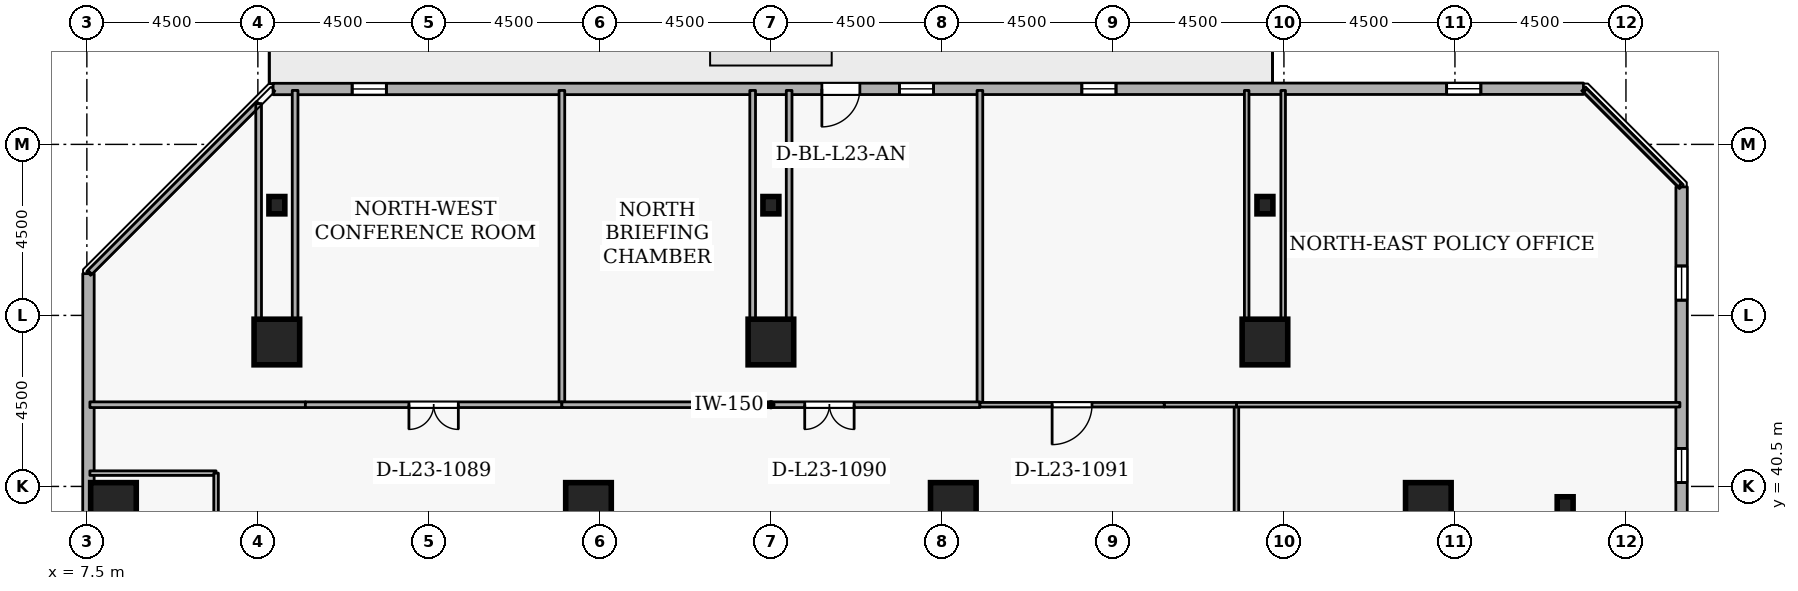
"""IFC4 building model, lengths in metres.
Left out: names, types, materials, properties, quantities, classifications, styles, units other than length and angle.
Written with IfcOpenShell. Run it as: python <this file> out.ifc"""

import sys

from ifc_helpers import new_model, si_unit, direction, frame, frame_2d, origin, origin_2d, place, context, subcontext, project, spatial, rectangle, i_section, extrude, element, fill, save


model = new_model("IFC4")
c1 = context("Model", 3, precision=1e-05, world=origin(), true_north=direction((0.0, 1.0)))
c2 = subcontext(c1, "Body", "Model", "MODEL_VIEW")
j1 = project(units=[si_unit("LENGTHUNIT", "METRE"), si_unit("PLANEANGLEUNIT", "RADIAN")], contexts=[c1])
p1 = place(None, origin())
s1 = spatial("IfcSite", under=j1, at=p1, CompositionType="ELEMENT")
p2 = place(p1, origin())
s2 = spatial("IfcBuilding", under=s1, at=p2, CompositionType="ELEMENT")
p3 = place(p2, frame((0.0, 0.0, 90.9)))
s3 = spatial("IfcBuildingStorey", under=s2, at=p3, CompositionType="ELEMENT", Elevation=90.9)
for number, where, z_axis, x_axis in (
    (1, (42.8, 40.0, 0.0), (0.0, 0.0, 1.0), (1.0, 0.0, 0.0)),
    (2, (12.5, 44.3, 0.0), (0.0, 0.0, 1.0), (1.0, 0.0, 0.0)),
    (3, (25.5, 44.3, 0.0), (0.0, 0.0, 1.0), (1.0, 0.0, 0.0)),
    (4, (38.5, 44.3, 0.0), (0.0, 0.0, 1.0), (1.0, 0.0, 0.0)),
    (5, (8.2, 40.0, 0.0), (0.0, 0.0, 1.0), (1.0, 0.0, 0.0)),
    (6, (20.7, 40.0, 0.0), (0.0, 0.0, 1.0), (1.0, 0.0, 0.0)),
    (7, (30.3, 40.0, 0.0), (0.0, 0.0, 1.0), (1.0, 0.0, 0.0)),
):
    element("IfcColumn", number, at=place(p3, frame(where, z_axis=z_axis, x_axis=x_axis)), inside=s3, PredefinedType="COLUMN", context=c2, shape_type="SweptSolid", body=[
        extrude(rectangle(XDim=1.2, YDim=1.2, at=origin_2d()), origin(), (0.0, 0.0, 1.0), 3.6),
    ])
for number, where, z_axis, x_axis in (
    (8, (46.4, 40.0, 0.0), (0.0, 0.0, 1.0), (1.0, 0.0, 0.0)),
    (9, (12.5, 47.9, 0.0), (0.0, 0.0, 1.0), (1.0, 0.0, 0.0)),
    (10, (25.5, 47.9, 0.0), (0.0, 0.0, 1.0), (1.0, 0.0, 0.0)),
    (11, (38.5, 47.9, 0.0), (0.0, 0.0, 1.0), (1.0, 0.0, 0.0)),
):
    element("IfcColumn", number, at=place(p3, frame(where, z_axis=z_axis, x_axis=x_axis)), inside=s3, PredefinedType="COLUMN", context=c2, shape_type="SweptSolid", body=[
        extrude(i_section(OverallWidth=0.418, OverallDepth=0.456, WebThickness=0.042, FlangeThickness=0.067, FilletRadius=0.015, at=origin_2d()), origin(), (0.0, 0.0, 1.0), 3.6),
    ])
p4 = place(p3, frame((49.457, 13.901, 0.0), z_axis=(0.0, 0.0, 1.0), x_axis=(0.000212414941, 0.99999997744, 0.0)))
e12 = element("IfcWall", 12, at=p4, inside=s3, PredefinedType="STANDARD", context=c2, shape_type="SweptSolid", body=[
    extrude(rectangle(XDim=34.481, YDim=0.3, at=frame_2d((17.24, 0.0))), origin(), (0.0, 0.0, 1.0), 2.7),
])
p5 = place(p4, frame((2.7, 0.0, 0.72)))
e13 = element("IfcOpeningElement", 13, at=p5, cuts=e12, PredefinedType="OPENING", context=c2, shape_type="SweptSolid", body=[
    extrude(rectangle(XDim=0.9, YDim=1.75, at=frame_2d((0.45, 0.875))), frame((0.0, 0.16, 0.0), z_axis=(0.0, -1.0, 0.0), x_axis=(1.0, 0.0, 0.0)), (0.0, 0.0, 1.0), 0.32),
])
p6 = place(p4, frame((7.5, 0.0, 0.72)))
e14 = element("IfcOpeningElement", 14, at=p6, cuts=e12, PredefinedType="OPENING", context=c2, shape_type="SweptSolid", body=[
    extrude(rectangle(XDim=0.9, YDim=1.75, at=frame_2d((0.45, 0.875))), frame((0.0, 0.16, 0.0), z_axis=(0.0, -1.0, 0.0), x_axis=(1.0, 0.0, 0.0)), (0.0, 0.0, 1.0), 0.32),
])
p7 = place(p4, frame((17.1, 0.0, 0.72)))
e15 = element("IfcOpeningElement", 15, at=p7, cuts=e12, PredefinedType="OPENING", context=c2, shape_type="SweptSolid", body=[
    extrude(rectangle(XDim=0.9, YDim=1.75, at=frame_2d((0.45, 0.875))), frame((0.0, 0.16, 0.0), z_axis=(0.0, -1.0, 0.0), x_axis=(1.0, 0.0, 0.0)), (0.0, 0.0, 1.0), 0.32),
])
p8 = place(p4, frame((21.9, 0.0, 0.72)))
e16 = element("IfcOpeningElement", 16, at=p8, cuts=e12, PredefinedType="OPENING", context=c2, shape_type="SweptSolid", body=[
    extrude(rectangle(XDim=0.9, YDim=1.75, at=frame_2d((0.45, 0.875))), frame((0.0, 0.16, 0.0), z_axis=(0.0, -1.0, 0.0), x_axis=(1.0, 0.0, 0.0)), (0.0, 0.0, 1.0), 0.32),
])
p9 = place(p4, frame((26.7, 0.0, 0.72)))
e17 = element("IfcOpeningElement", 17, at=p9, cuts=e12, PredefinedType="OPENING", context=c2, shape_type="SweptSolid", body=[
    extrude(rectangle(XDim=0.9, YDim=1.75, at=frame_2d((0.45, 0.875))), frame((0.0, 0.16, 0.0), z_axis=(0.0, -1.0, 0.0), x_axis=(1.0, 0.0, 0.0)), (0.0, 0.0, 1.0), 0.32),
])
p10 = place(p4, frame((31.5, 0.0, 0.72)))
e18 = element("IfcOpeningElement", 18, at=p10, cuts=e12, PredefinedType="OPENING", context=c2, shape_type="SweptSolid", body=[
    extrude(rectangle(XDim=0.9, YDim=1.75, at=frame_2d((0.45, 0.875))), frame((0.0, 0.16, 0.0), z_axis=(0.0, -1.0, 0.0), x_axis=(1.0, 0.0, 0.0)), (0.0, 0.0, 1.0), 0.32),
])
p11 = place(p3, frame((46.881, 50.965, 0.0), z_axis=(0.0, 0.0, 1.0), x_axis=(-0.99999997744, -0.000212414941, 0.0)))
e19 = element("IfcWall", 19, at=p11, inside=s3, PredefinedType="STANDARD", context=c2, shape_type="SweptSolid", body=[
    extrude(rectangle(XDim=34.481, YDim=0.3, at=frame_2d((17.24, 0.0))), origin(), (0.0, 0.0, 1.0), 2.7),
])
p12 = place(p11, frame((19.04, 0.0, 0.0)))
e20 = element("IfcOpeningElement", 20, at=p12, cuts=e19, PredefinedType="OPENING", context=c2, shape_type="SweptSolid", body=[
    extrude(rectangle(XDim=1.0, YDim=2.08, at=frame_2d((0.5, 1.04))), frame((0.0, 0.16, 0.0), z_axis=(0.0, -1.0, 0.0), x_axis=(1.0, 0.0, 0.0)), (0.0, 0.0, 1.0), 0.32),
])
p13 = place(p11, frame((2.7, 0.0, 0.72)))
e21 = element("IfcOpeningElement", 21, at=p13, cuts=e19, PredefinedType="OPENING", context=c2, shape_type="SweptSolid", body=[
    extrude(rectangle(XDim=0.9, YDim=1.75, at=frame_2d((0.45, 0.875))), frame((0.0, 0.16, 0.0), z_axis=(0.0, -1.0, 0.0), x_axis=(1.0, 0.0, 0.0)), (0.0, 0.0, 1.0), 0.32),
])
p14 = place(p11, frame((12.3, 0.0, 0.72)))
e22 = element("IfcOpeningElement", 22, at=p14, cuts=e19, PredefinedType="OPENING", context=c2, shape_type="SweptSolid", body=[
    extrude(rectangle(XDim=0.9, YDim=1.75, at=frame_2d((0.45, 0.875))), frame((0.0, 0.16, 0.0), z_axis=(0.0, -1.0, 0.0), x_axis=(1.0, 0.0, 0.0)), (0.0, 0.0, 1.0), 0.32),
])
p15 = place(p11, frame((17.1, 0.0, 0.72)))
e23 = element("IfcOpeningElement", 23, at=p15, cuts=e19, PredefinedType="OPENING", context=c2, shape_type="SweptSolid", body=[
    extrude(rectangle(XDim=0.9, YDim=1.75, at=frame_2d((0.45, 0.875))), frame((0.0, 0.16, 0.0), z_axis=(0.0, -1.0, 0.0), x_axis=(1.0, 0.0, 0.0)), (0.0, 0.0, 1.0), 0.32),
])
p16 = place(p11, frame((31.5, 0.0, 0.72)))
e24 = element("IfcOpeningElement", 24, at=p16, cuts=e19, PredefinedType="OPENING", context=c2, shape_type="SweptSolid", body=[
    extrude(rectangle(XDim=0.9, YDim=1.75, at=frame_2d((0.45, 0.875))), frame((0.0, 0.16, 0.0), z_axis=(0.0, -1.0, 0.0), x_axis=(1.0, 0.0, 0.0)), (0.0, 0.0, 1.0), 0.32),
])
p17 = place(p3, frame((7.543, 46.099, 0.0), z_axis=(0.0, 0.0, 1.0), x_axis=(-0.000212414941, -0.99999997744, 0.0)))
e25 = element("IfcWall", 25, at=p17, inside=s3, PredefinedType="STANDARD", context=c2, shape_type="SweptSolid", body=[
    extrude(rectangle(XDim=34.481, YDim=0.3, at=frame_2d((17.24, 0.0))), origin(), (0.0, 0.0, 1.0), 2.7),
])
p18 = place(p17, frame((7.5, 0.0, 0.72)))
e26 = element("IfcOpeningElement", 26, at=p18, cuts=e25, PredefinedType="OPENING", context=c2, shape_type="SweptSolid", body=[
    extrude(rectangle(XDim=0.9, YDim=1.75, at=frame_2d((0.45, 0.875))), frame((0.0, 0.16, 0.0), z_axis=(0.0, -1.0, 0.0), x_axis=(1.0, 0.0, 0.0)), (0.0, 0.0, 1.0), 0.32),
])
p19 = place(p17, frame((12.3, 0.0, 0.72)))
e27 = element("IfcOpeningElement", 27, at=p19, cuts=e25, PredefinedType="OPENING", context=c2, shape_type="SweptSolid", body=[
    extrude(rectangle(XDim=0.9, YDim=1.75, at=frame_2d((0.45, 0.875))), frame((0.0, 0.16, 0.0), z_axis=(0.0, -1.0, 0.0), x_axis=(1.0, 0.0, 0.0)), (0.0, 0.0, 1.0), 0.32),
])
p20 = place(p17, frame((17.1, 0.0, 0.72)))
e28 = element("IfcOpeningElement", 28, at=p20, cuts=e25, PredefinedType="OPENING", context=c2, shape_type="SweptSolid", body=[
    extrude(rectangle(XDim=0.9, YDim=1.75, at=frame_2d((0.45, 0.875))), frame((0.0, 0.16, 0.0), z_axis=(0.0, -1.0, 0.0), x_axis=(1.0, 0.0, 0.0)), (0.0, 0.0, 1.0), 0.32),
])
p21 = place(p17, frame((21.9, 0.0, 0.72)))
e29 = element("IfcOpeningElement", 29, at=p21, cuts=e25, PredefinedType="OPENING", context=c2, shape_type="SweptSolid", body=[
    extrude(rectangle(XDim=0.9, YDim=1.75, at=frame_2d((0.45, 0.875))), frame((0.0, 0.16, 0.0), z_axis=(0.0, -1.0, 0.0), x_axis=(1.0, 0.0, 0.0)), (0.0, 0.0, 1.0), 0.32),
])
p22 = place(p17, frame((26.7, 0.0, 0.72)))
e30 = element("IfcOpeningElement", 30, at=p22, cuts=e25, PredefinedType="OPENING", context=c2, shape_type="SweptSolid", body=[
    extrude(rectangle(XDim=0.9, YDim=1.75, at=frame_2d((0.45, 0.875))), frame((0.0, 0.16, 0.0), z_axis=(0.0, -1.0, 0.0), x_axis=(1.0, 0.0, 0.0)), (0.0, 0.0, 1.0), 0.32),
])
p23 = place(p3, frame((7.58, 40.85, 0.0), z_axis=(0.0, 0.0, 1.0), x_axis=(1.0, 0.0, 0.0)))
e31 = element("IfcWall", 31, at=p23, inside=s3, PredefinedType="PARTITIONING", context=c2, shape_type="SweptSolid", body=[
    extrude(rectangle(XDim=3.32, YDim=0.12, at=frame_2d((1.66, 0.0))), origin(), (0.0, 0.0, 1.0), 3.34),
])
p24 = place(p3, frame((10.9, 40.85, 0.0), z_axis=(0.0, 0.0, 1.0), x_axis=(0.0, -1.0, 0.0)))
e32 = element("IfcWall", 32, at=p24, inside=s3, PredefinedType="PARTITIONING", context=c2, shape_type="SweptSolid", body=[
    extrude(rectangle(XDim=4.912, YDim=0.12, at=frame_2d((2.456, 0.0))), origin(), (0.0, 0.0, 1.0), 3.34),
])
p25 = place(p3, frame((37.75, 33.3, 0.0), z_axis=(0.0, 0.0, 1.0), x_axis=(0.0, 1.0, 0.0)))
e33 = element("IfcWall", 33, at=p25, inside=s3, PredefinedType="PARTITIONING", context=c2, shape_type="SweptSolid", body=[
    extrude(rectangle(XDim=9.35, YDim=0.12, at=frame_2d((4.675, 0.0))), origin(), (0.0, 0.0, 1.0), 3.34),
])
p26 = place(p25, frame((4.15, 0.0, 0.0)))
e34 = element("IfcOpeningElement", 34, at=p26, cuts=e33, PredefinedType="OPENING", context=c2, shape_type="SweptSolid", body=[
    extrude(rectangle(XDim=1.05, YDim=2.1, at=frame_2d((0.525, 1.05))), frame((0.0, 0.07, 0.0), z_axis=(0.0, -1.0, 0.0), x_axis=(1.0, 0.0, 0.0)), (0.0, 0.0, 1.0), 0.14),
])
p27 = place(p3, frame((37.75, 42.65, 0.0), z_axis=(0.0, 0.0, 1.0), x_axis=(1.0, 0.0, 0.0)))
e35 = element("IfcWall", 35, at=p27, inside=s3, PredefinedType="PARTITIONING", context=c2, shape_type="SweptSolid", body=[
    extrude(rectangle(XDim=11.67, YDim=0.12, at=frame_2d((5.835, 0.0))), origin(), (0.0, 0.0, 1.0), 3.34),
])
p28 = place(p3, frame((13.25, 42.65, 0.0), z_axis=(0.0, 0.0, 1.0), x_axis=(-1.0, 0.0, 0.0)))
e36 = element("IfcWall", 36, at=p28, inside=s3, PredefinedType="PARTITIONING", context=c2, shape_type="SweptSolid", body=[
    extrude(rectangle(XDim=5.67, YDim=0.15, at=frame_2d((2.835, 0.0))), origin(), (0.0, 0.0, 1.0), 3.34),
])
p29 = place(p3, frame((7.58, 46.135, 0.0), z_axis=(0.0, 0.0, 1.0), x_axis=(0.707106781187, 0.707106781187, 0.0)))
e37 = element("IfcWall", 37, at=p29, inside=s3, PredefinedType="PARTITIONING", context=c2, shape_type="SweptSolid", body=[
    extrude(rectangle(XDim=6.279, YDim=0.15, at=frame_2d((3.14, 0.0))), origin(), (0.0, 0.0, 1.0), 3.34),
])
p30 = place(p3, frame((12.02, 50.574, 0.0), z_axis=(0.0, 0.0, 1.0), x_axis=(0.0, -1.0, 0.0)))
e38 = element("IfcWall", 38, at=p30, inside=s3, PredefinedType="PARTITIONING", context=c2, shape_type="SweptSolid", body=[
    extrude(rectangle(XDim=6.274, YDim=0.15, at=frame_2d((3.137, 0.0))), origin(), (0.0, 0.0, 1.0), 3.34),
])
p31 = place(p3, frame((12.98, 44.3, 0.0), z_axis=(0.0, 0.0, 1.0), x_axis=(0.0, 1.0, 0.0)))
e39 = element("IfcWall", 39, at=p31, inside=s3, PredefinedType="PARTITIONING", context=c2, shape_type="SweptSolid", body=[
    extrude(rectangle(XDim=6.62, YDim=0.15, at=frame_2d((3.31, 0.0))), origin(), (0.0, 0.0, 1.0), 3.34),
])
p32 = place(p3, frame((20.0, 50.92, 0.0), z_axis=(0.0, 0.0, 1.0), x_axis=(0.0, -1.0, 0.0)))
e40 = element("IfcWall", 40, at=p32, inside=s3, PredefinedType="PARTITIONING", context=c2, shape_type="SweptSolid", body=[
    extrude(rectangle(XDim=8.27, YDim=0.15, at=frame_2d((4.135, 0.0))), origin(), (0.0, 0.0, 1.0), 3.34),
])
p33 = place(p3, frame((20.0, 42.65, 0.0), z_axis=(0.0, 0.0, 1.0), x_axis=(-1.0, 0.0, 0.0)))
e41 = element("IfcWall", 41, at=p33, inside=s3, PredefinedType="PARTITIONING", context=c2, shape_type="SweptSolid", body=[
    extrude(rectangle(XDim=6.75, YDim=0.15, at=frame_2d((3.375, 0.0))), origin(), (0.0, 0.0, 1.0), 3.34),
])
p34 = place(p33, frame((2.725, 0.0, 0.0)))
e42 = element("IfcOpeningElement", 42, at=p34, cuts=e41, PredefinedType="OPENING", context=c2, shape_type="SweptSolid", body=[
    extrude(rectangle(XDim=1.3, YDim=2.12, at=frame_2d((0.65, 1.06))), frame((0.0, 0.085, 0.0), z_axis=(0.0, -1.0, 0.0), x_axis=(1.0, 0.0, 0.0)), (0.0, 0.0, 1.0), 0.17),
])
for number, where, z_axis, x_axis in (
    (43, (25.02, 50.92, 0.0), (0.0, 0.0, 1.0), (0.0, -1.0, 0.0)),
    (44, (25.98, 44.3, 0.0), (0.0, 0.0, 1.0), (0.0, 1.0, 0.0)),
):
    element("IfcWall", number, at=place(p3, frame(where, z_axis=z_axis, x_axis=x_axis)), inside=s3, PredefinedType="PARTITIONING", context=c2, shape_type="SweptSolid", body=[
        extrude(rectangle(XDim=6.62, YDim=0.15, at=frame_2d((3.31, 0.0))), origin(), (0.0, 0.0, 1.0), 3.34),
    ])
p35 = place(p3, frame((31.0, 50.92, 0.0), z_axis=(0.0, 0.0, 1.0), x_axis=(0.0, -1.0, 0.0)))
e45 = element("IfcWall", 45, at=p35, inside=s3, PredefinedType="PARTITIONING", context=c2, shape_type="SweptSolid", body=[
    extrude(rectangle(XDim=8.27, YDim=0.15, at=frame_2d((4.135, 0.0))), origin(), (0.0, 0.0, 1.0), 3.34),
])
p36 = place(p3, frame((31.0, 42.65, 0.0), z_axis=(0.0, 0.0, 1.0), x_axis=(-1.0, 0.0, 0.0)))
e46 = element("IfcWall", 46, at=p36, inside=s3, PredefinedType="PARTITIONING", context=c2, shape_type="SweptSolid", body=[
    extrude(rectangle(XDim=11.0, YDim=0.15, at=frame_2d((5.5, 0.0))), origin(), (0.0, 0.0, 1.0), 3.34),
])
p37 = place(p36, frame((3.31, 0.0, 0.0)))
e47 = element("IfcOpeningElement", 47, at=p37, cuts=e46, PredefinedType="OPENING", context=c2, shape_type="SweptSolid", body=[
    extrude(rectangle(XDim=1.3, YDim=2.12, at=frame_2d((0.65, 1.06))), frame((0.0, 0.085, 0.0), z_axis=(0.0, -1.0, 0.0), x_axis=(1.0, 0.0, 0.0)), (0.0, 0.0, 1.0), 0.17),
])
p38 = place(p3, frame((37.75, 42.65, 0.0), z_axis=(0.0, 0.0, 1.0), x_axis=(-1.0, 0.0, 0.0)))
e48 = element("IfcWall", 48, at=p38, inside=s3, PredefinedType="PARTITIONING", context=c2, shape_type="SweptSolid", body=[
    extrude(rectangle(XDim=1.9, YDim=0.12, at=frame_2d((0.95, 0.0))), origin(), (0.0, 0.0, 1.0), 2.895),
])
p39 = place(p3, frame((35.85, 42.65, 0.0), z_axis=(0.0, 0.0, 1.0), x_axis=(-1.0, 0.0, 0.0)))
e49 = element("IfcWall", 49, at=p39, inside=s3, PredefinedType="PARTITIONING", context=c2, shape_type="SweptSolid", body=[
    extrude(rectangle(XDim=4.85, YDim=0.12, at=frame_2d((2.425, 0.0))), origin(), (0.0, 0.0, 1.0), 2.895),
])
p40 = place(p39, frame((1.9, 0.0, 0.0)))
e50 = element("IfcOpeningElement", 50, at=p40, cuts=e49, PredefinedType="OPENING", context=c2, shape_type="SweptSolid", body=[
    extrude(rectangle(XDim=1.05, YDim=2.1, at=frame_2d((0.525, 1.05))), frame((0.0, 0.07, 0.0), z_axis=(0.0, -1.0, 0.0), x_axis=(1.0, 0.0, 0.0)), (0.0, 0.0, 1.0), 0.14),
])
for number, where, z_axis, x_axis in (
    (51, (38.02, 50.92, 0.0), (0.0, 0.0, 1.0), (0.0, -1.0, 0.0)),
    (52, (38.98, 44.3, 0.0), (0.0, 0.0, 1.0), (0.0, 1.0, 0.0)),
):
    element("IfcWall", number, at=place(p3, frame(where, z_axis=z_axis, x_axis=x_axis)), inside=s3, PredefinedType="PARTITIONING", context=c2, shape_type="SweptSolid", body=[
        extrude(rectangle(XDim=6.62, YDim=0.12, at=frame_2d((3.31, 0.0))), origin(), (0.0, 0.0, 1.0), 3.34),
    ])
p41 = place(p3, frame((46.925, 50.92, 0.0), z_axis=(0.0, 0.0, 1.0), x_axis=(0.707106781187, -0.707106781187, 0.0)))
e53 = element("IfcWall", 53, at=p41, inside=s3, PredefinedType="PARTITIONING", context=c2, shape_type="SweptSolid", body=[
    extrude(rectangle(XDim=3.528, YDim=0.12, at=frame_2d((1.764, 0.0))), origin(), (0.0, 0.0, 1.0), 3.34),
])
p42 = place(p9, origin())
e54 = element("IfcWindow", 54, at=p42, inside=s3, PartitioningType="SINGLE_PANEL", PredefinedType="WINDOW", context=c2, shape_type="SweptSolid", body=[
    extrude(rectangle(XDim=0.9, YDim=1.75, at=frame_2d((0.45, 0.875))), frame((0.0, 0.03, 0.0), z_axis=(0.0, -1.0, 0.0), x_axis=(1.0, 0.0, 0.0)), (0.0, 0.0, 1.0), 0.06),
])
fill(e17, e54)
p43 = place(p10, origin())
e55 = element("IfcWindow", 55, at=p43, inside=s3, PartitioningType="SINGLE_PANEL", PredefinedType="WINDOW", context=c2, shape_type="SweptSolid", body=[
    extrude(rectangle(XDim=0.9, YDim=1.75, at=frame_2d((0.45, 0.875))), frame((0.0, 0.03, 0.0), z_axis=(0.0, -1.0, 0.0), x_axis=(1.0, 0.0, 0.0)), (0.0, 0.0, 1.0), 0.06),
])
fill(e18, e55)
p44 = place(p12, origin())
e56 = element("IfcDoor", 56, at=p44, inside=s3, OperationType="SINGLE_SWING_RIGHT", PredefinedType="DOOR", context=c2, shape_type="SweptSolid", body=[
    extrude(rectangle(XDim=1.0, YDim=2.08, at=frame_2d((0.5, 1.04))), frame((0.0, 0.025, 0.0), z_axis=(0.0, -1.0, 0.0), x_axis=(1.0, 0.0, 0.0)), (0.0, 0.0, 1.0), 0.05),
])
fill(e20, e56)
p45 = place(p13, origin())
e57 = element("IfcWindow", 57, at=p45, inside=s3, PartitioningType="SINGLE_PANEL", PredefinedType="WINDOW", context=c2, shape_type="SweptSolid", body=[
    extrude(rectangle(XDim=0.9, YDim=1.75, at=frame_2d((0.45, 0.875))), frame((0.0, 0.03, 0.0), z_axis=(0.0, -1.0, 0.0), x_axis=(1.0, 0.0, 0.0)), (0.0, 0.0, 1.0), 0.06),
])
fill(e21, e57)
p46 = place(p14, origin())
e58 = element("IfcWindow", 58, at=p46, inside=s3, PartitioningType="SINGLE_PANEL", PredefinedType="WINDOW", context=c2, shape_type="SweptSolid", body=[
    extrude(rectangle(XDim=0.9, YDim=1.75, at=frame_2d((0.45, 0.875))), frame((0.0, 0.03, 0.0), z_axis=(0.0, -1.0, 0.0), x_axis=(1.0, 0.0, 0.0)), (0.0, 0.0, 1.0), 0.06),
])
fill(e22, e58)
p47 = place(p15, origin())
e59 = element("IfcWindow", 59, at=p47, inside=s3, PartitioningType="SINGLE_PANEL", PredefinedType="WINDOW", context=c2, shape_type="SweptSolid", body=[
    extrude(rectangle(XDim=0.9, YDim=1.75, at=frame_2d((0.45, 0.875))), frame((0.0, 0.03, 0.0), z_axis=(0.0, -1.0, 0.0), x_axis=(1.0, 0.0, 0.0)), (0.0, 0.0, 1.0), 0.06),
])
fill(e23, e59)
p48 = place(p16, origin())
e60 = element("IfcWindow", 60, at=p48, inside=s3, PartitioningType="SINGLE_PANEL", PredefinedType="WINDOW", context=c2, shape_type="SweptSolid", body=[
    extrude(rectangle(XDim=0.9, YDim=1.75, at=frame_2d((0.45, 0.875))), frame((0.0, 0.03, 0.0), z_axis=(0.0, -1.0, 0.0), x_axis=(1.0, 0.0, 0.0)), (0.0, 0.0, 1.0), 0.06),
])
fill(e24, e60)
p49 = place(p34, origin())
e61 = element("IfcDoor", 61, at=p49, inside=s3, OperationType="DOUBLE_DOOR_SINGLE_SWING", PredefinedType="DOOR", context=c2, shape_type="SweptSolid", body=[
    extrude(rectangle(XDim=1.3, YDim=2.12, at=frame_2d((0.65, 1.06))), frame((0.0, 0.025, 0.0), z_axis=(0.0, -1.0, 0.0), x_axis=(1.0, 0.0, 0.0)), (0.0, 0.0, 1.0), 0.05),
])
fill(e42, e61)
p50 = place(p37, origin())
e62 = element("IfcDoor", 62, at=p50, inside=s3, OperationType="DOUBLE_DOOR_SINGLE_SWING", PredefinedType="DOOR", context=c2, shape_type="SweptSolid", body=[
    extrude(rectangle(XDim=1.3, YDim=2.12, at=frame_2d((0.65, 1.06))), frame((0.0, 0.025, 0.0), z_axis=(0.0, -1.0, 0.0), x_axis=(1.0, 0.0, 0.0)), (0.0, 0.0, 1.0), 0.05),
])
fill(e47, e62)
p51 = place(p40, origin())
e63 = element("IfcDoor", 63, at=p51, inside=s3, OperationType="SINGLE_SWING_RIGHT", PredefinedType="DOOR", context=c2, shape_type="SweptSolid", body=[
    extrude(rectangle(XDim=1.05, YDim=2.1, at=frame_2d((0.525, 1.05))), frame((0.0, 0.025, 0.0), z_axis=(0.0, -1.0, 0.0), x_axis=(1.0, 0.0, 0.0)), (0.0, 0.0, 1.0), 0.05),
])
fill(e50, e63)
save(model, sys.argv[1])
